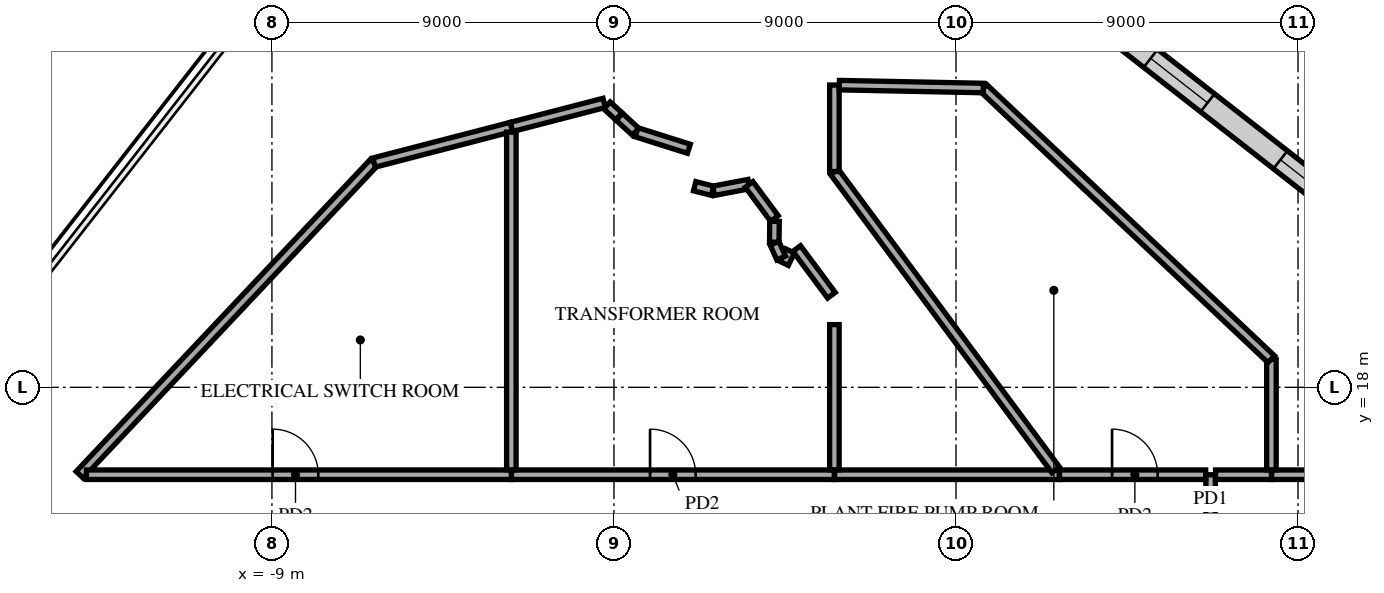
"""IFC4 building model, lengths in metres.
Left out: names, types, materials, properties, quantities, classifications, styles, units other than length and angle.
Written with IfcOpenShell. Run it as: python <this file> out.ifc"""

import sys

from ifc_helpers import new_model, si_unit, direction, frame, frame_2d, origin, place, context, subcontext, project, spatial, rectangle, extrude, element, fill, save


model = new_model("IFC4")
c1 = context("Model", 3, precision=1e-05, world=origin(), true_north=direction((0.0, 1.0)))
c2 = subcontext(c1, "Body", "Model", "MODEL_VIEW")
j1 = project(units=[si_unit("LENGTHUNIT", "METRE"), si_unit("PLANEANGLEUNIT", "RADIAN")], contexts=[c1])
p1 = place(None, origin())
s1 = spatial("IfcSite", under=j1, at=p1, CompositionType="ELEMENT")
p2 = place(p1, origin())
s2 = spatial("IfcBuilding", under=s1, at=p2, CompositionType="ELEMENT")
p3 = place(p2, frame((0.0, 0.0, 237.3)))
s3 = spatial("IfcBuildingStorey", under=s2, at=p3, CompositionType="ELEMENT", Elevation=237.3)
p4 = place(p3, frame((15.7, 12.227, 0.0), z_axis=(0.0, 0.0, 1.0), x_axis=(0.0, 1.0, 0.0)))
e1 = element("IfcWall", 1, at=p4, inside=s3, PredefinedType="PARTITIONING", context=c2, shape_type="SweptSolid", body=[
    extrude(rectangle(XDim=3.473, YDim=0.25, at=frame_2d((1.736, 0.0))), origin(), (0.0, 0.0, 1.0), 4.72),
])
p5 = place(p4, frame((1.232, 0.0, 0.0)))
e2 = element("IfcOpeningElement", 2, at=p5, cuts=e1, PredefinedType="OPENING", context=c2, shape_type="SweptSolid", body=[
    extrude(rectangle(XDim=1.0, YDim=2.1, at=frame_2d((0.5, 1.05))), frame((0.0, 0.135, 0.0), z_axis=(0.0, -1.0, 0.0), x_axis=(1.0, 0.0, 0.0)), (0.0, 0.0, 1.0), 0.27),
])
p6 = place(p3, frame((-14.06, 15.7, 0.0), z_axis=(0.0, 0.0, 1.0), x_axis=(0.685903590109, 0.727692424775, 0.0)))
e3 = element("IfcWall", 3, at=p6, inside=s3, PredefinedType="PARTITIONING", context=c2, shape_type="SweptSolid", body=[
    extrude(rectangle(XDim=11.287, YDim=0.25, at=frame_2d((5.644, 0.0))), origin(), (0.0, 0.0, 1.0), 4.72),
])
p7 = place(p3, frame((-13.881, 15.7, 0.0), z_axis=(0.0, 0.0, 1.0), x_axis=(1.0, 0.0, 0.0)))
e4 = element("IfcWall", 4, at=p7, inside=s3, PredefinedType="PARTITIONING", context=c2, shape_type="SweptSolid", body=[
    extrude(rectangle(XDim=11.181, YDim=0.25, at=frame_2d((5.591, 0.0))), origin(), (0.0, 0.0, 1.0), 4.72),
])
p8 = place(p7, frame((4.901, 0.0, 0.0)))
e5 = element("IfcOpeningElement", 5, at=p8, cuts=e4, PredefinedType="OPENING", context=c2, shape_type="SweptSolid", body=[
    extrude(rectangle(XDim=1.2, YDim=2.1, at=frame_2d((0.6, 1.05))), frame((0.0, 0.135, 0.0), z_axis=(0.0, -1.0, 0.0), x_axis=(1.0, 0.0, 0.0)), (0.0, 0.0, 1.0), 0.27),
])
p9 = place(p3, frame((-2.695, 15.7, 0.0), z_axis=(0.0, 0.0, 1.0), x_axis=(1.0, 0.0, 0.0)))
e6 = element("IfcWall", 6, at=p9, inside=s3, PredefinedType="PARTITIONING", context=c2, shape_type="SweptSolid", body=[
    extrude(rectangle(XDim=8.495, YDim=0.25, at=frame_2d((4.248, 0.0))), origin(), (0.0, 0.0, 1.0), 4.72),
])
p10 = place(p9, frame((3.645, 0.0, 0.0)))
e7 = element("IfcOpeningElement", 7, at=p10, cuts=e6, PredefinedType="OPENING", context=c2, shape_type="SweptSolid", body=[
    extrude(rectangle(XDim=1.2, YDim=2.1, at=frame_2d((0.6, 1.05))), frame((0.0, 0.135, 0.0), z_axis=(0.0, -1.0, 0.0), x_axis=(1.0, 0.0, 0.0)), (0.0, 0.0, 1.0), 0.27),
])
p11 = place(p3, frame((5.805, 15.7, 0.0), z_axis=(0.0, 0.0, 1.0), x_axis=(1.0, 0.0, 0.0)))
e8 = element("IfcWall", 8, at=p11, inside=s3, PredefinedType="PARTITIONING", context=c2, shape_type="SweptSolid", body=[
    extrude(rectangle(XDim=5.914, YDim=0.25, at=frame_2d((2.957, 0.0))), origin(), (0.0, 0.0, 1.0), 4.42),
])
p12 = place(p3, frame((5.8, 23.673, 0.0), z_axis=(0.0, 0.0, 1.0), x_axis=(0.5960533643, -0.802944821832, 0.0)))
e9 = element("IfcWall", 9, at=p12, inside=s3, PredefinedType="PARTITIONING", context=c2, shape_type="SweptSolid", body=[
    extrude(rectangle(XDim=9.767, YDim=0.25, at=frame_2d((4.884, 0.0))), origin(), (0.0, 0.0, 1.0), 4.72),
])
p13 = place(p3, frame((11.723, 15.7, 0.0), z_axis=(0.0, 0.0, 1.0), x_axis=(1.0, 0.0, 0.0)))
e10 = element("IfcWall", 10, at=p13, inside=s3, PredefinedType="PARTITIONING", context=c2, shape_type="SweptSolid", body=[
    extrude(rectangle(XDim=3.847, YDim=0.25, at=frame_2d((1.923, 0.0))), origin(), (0.0, 0.0, 1.0), 4.72),
])
p14 = place(p13, frame((1.383, 0.0, 0.0)))
e11 = element("IfcOpeningElement", 11, at=p14, cuts=e10, PredefinedType="OPENING", context=c2, shape_type="SweptSolid", body=[
    extrude(rectangle(XDim=1.2, YDim=2.1, at=frame_2d((0.6, 1.05))), frame((0.0, 0.135, 0.0), z_axis=(0.0, -1.0, 0.0), x_axis=(1.0, 0.0, 0.0)), (0.0, 0.0, 1.0), 0.27),
])
p15 = place(p3, frame((15.83, 15.7, 0.0), z_axis=(0.0, 0.0, 1.0), x_axis=(1.0, 0.0, 0.0)))
e12 = element("IfcWall", 12, at=p15, inside=s3, PredefinedType="PARTITIONING", context=c2, shape_type="SweptSolid", body=[
    extrude(rectangle(XDim=1.47, YDim=0.25, at=frame_2d((0.735, 0.0))), origin(), (0.0, 0.0, 1.0), 5.24),
])
p16 = place(p3, frame((17.305, 15.7, 0.0), z_axis=(0.0, 0.0, 1.0), x_axis=(1.0, 0.0, 0.0)))
e13 = element("IfcWall", 13, at=p16, inside=s3, PredefinedType="PARTITIONING", context=c2, shape_type="SweptSolid", body=[
    extrude(rectangle(XDim=3.216, YDim=0.25, at=frame_2d((1.608, 0.0))), origin(), (0.0, 0.0, 1.0), 4.72),
])
p17 = place(p3, frame((17.3, 15.83, 0.0), z_axis=(0.0, 0.0, 1.0), x_axis=(0.0, 1.0, 0.0)))
e14 = element("IfcWall", 14, at=p17, inside=s3, PredefinedType="PARTITIONING", context=c2, shape_type="SweptSolid", body=[
    extrude(rectangle(XDim=2.906, YDim=0.25, at=frame_2d((1.453, 0.0))), origin(), (0.0, 0.0, 1.0), 4.72),
])
p18 = place(p3, frame((5.8, 15.83, 0.0), z_axis=(0.0, 0.0, 1.0), x_axis=(0.0, 1.0, 0.0)))
e15 = element("IfcWall", 15, at=p18, inside=s3, PredefinedType="PARTITIONING", context=c2, shape_type="SweptSolid", body=[
    extrude(rectangle(XDim=3.821, YDim=0.25, at=frame_2d((1.91, 0.0))), origin(), (0.0, 0.0, 1.0), 4.42),
])
p19 = place(p3, frame((4.476, 21.262, 0.0), z_axis=(0.0, 0.0, 1.0), x_axis=(0.432927443795, 0.901428770569, 0.0)))
e16 = element("IfcWall", 16, at=p19, inside=s3, PredefinedType="PARTITIONING", context=c2, shape_type="SweptSolid", body=[
    extrude(rectangle(XDim=0.364, YDim=0.25, at=frame_2d((0.182, 0.0))), origin(), (0.0, 0.0, 1.0), 4.72),
])
p20 = place(p3, frame((4.808, 21.653, 0.0), z_axis=(0.0, 0.0, 1.0), x_axis=(0.59601596121, -0.802972586072, 0.0)))
e17 = element("IfcWall", 17, at=p20, inside=s3, PredefinedType="PARTITIONING", context=c2, shape_type="SweptSolid", body=[
    extrude(rectangle(XDim=1.532, YDim=0.25, at=frame_2d((0.766, 0.0))), origin(), (0.0, 0.0, 1.0), 5.24),
])
p21 = place(p3, frame((4.225, 21.79, 0.0), z_axis=(0.0, 0.0, 1.0), x_axis=(0.412201910165, -0.911092522885, 0.0)))
e18 = element("IfcWall", 18, at=p21, inside=s3, PredefinedType="PARTITIONING", context=c2, shape_type="SweptSolid", body=[
    extrude(rectangle(XDim=0.425, YDim=0.25, at=frame_2d((0.213, 0.0))), origin(), (0.0, 0.0, 1.0), 4.72),
])
p22 = place(p3, frame((4.219, 21.819, 0.0), z_axis=(0.0, 0.0, 1.0), x_axis=(0.011115364856, 0.999938222424, 0.0)))
e19 = element("IfcWall", 19, at=p22, inside=s3, PredefinedType="PARTITIONING", context=c2, shape_type="SweptSolid", body=[
    extrude(rectangle(XDim=0.549, YDim=0.25, at=frame_2d((0.274, 0.0))), origin(), (0.0, 0.0, 1.0), 4.72),
])
p23 = place(p3, frame((2.622, 23.172, 0.0), z_axis=(0.0, 0.0, 1.0), x_axis=(0.982424451701, 0.186660645823, 0.0)))
e20 = element("IfcWall", 20, at=p23, inside=s3, PredefinedType="PARTITIONING", context=c2, shape_type="SweptSolid", body=[
    extrude(rectangle(XDim=0.944, YDim=0.25, at=frame_2d((0.472, 0.0))), origin(), (0.0, 0.0, 1.0), 5.24),
])
p24 = place(p3, frame((2.124, 23.292, 0.0), z_axis=(0.0, 0.0, 1.0), x_axis=(0.969335780914, -0.24573999235, 0.0)))
e21 = element("IfcWall", 21, at=p24, inside=s3, PredefinedType="PARTITIONING", context=c2, shape_type="SweptSolid", body=[
    extrude(rectangle(XDim=0.484, YDim=0.25, at=frame_2d((0.242, 0.0))), origin(), (0.0, 0.0, 1.0), 5.24),
])
p25 = place(p3, frame((3.557, 23.339, 0.0), z_axis=(0.0, 0.0, 1.0), x_axis=(0.596106410755, -0.802905440918, 0.0)))
e22 = element("IfcWall", 22, at=p25, inside=s3, PredefinedType="PARTITIONING", context=c2, shape_type="SweptSolid", body=[
    extrude(rectangle(XDim=1.116, YDim=0.25, at=frame_2d((0.558, 0.0))), origin(), (0.0, 0.0, 1.0), 4.72),
])
p26 = place(p3, frame((5.8, 23.679, 0.0), z_axis=(0.0, 0.0, 1.0), x_axis=(0.0, 1.0, 0.0)))
e23 = element("IfcWall", 23, at=p26, inside=s3, PredefinedType="PARTITIONING", context=c2, shape_type="SweptSolid", body=[
    extrude(rectangle(XDim=2.276, YDim=0.25, at=frame_2d((1.138, 0.0))), origin(), (0.0, 0.0, 1.0), 5.24),
])
p27 = place(p3, frame((-6.312, 23.915, 0.0), z_axis=(0.0, 0.0, 1.0), x_axis=(0.967996898166, 0.250962158784, 0.0)))
e24 = element("IfcWall", 24, at=p27, inside=s3, PredefinedType="PARTITIONING", context=c2, shape_type="SweptSolid", body=[
    extrude(rectangle(XDim=3.732, YDim=0.25, at=frame_2d((1.866, 0.0))), origin(), (0.0, 0.0, 1.0), 4.72),
])
p28 = place(p3, frame((0.594, 24.712, 0.0), z_axis=(0.0, 0.0, 1.0), x_axis=(0.953505954531, -0.301374177186, 0.0)))
e25 = element("IfcWall", 25, at=p28, inside=s3, PredefinedType="PARTITIONING", context=c2, shape_type="SweptSolid", body=[
    extrude(rectangle(XDim=1.444, YDim=0.25, at=frame_2d((0.722, 0.0))), origin(), (0.0, 0.0, 1.0), 5.24),
])
p29 = place(p3, frame((-2.7, 15.83, 0.0), z_axis=(0.0, 0.0, 1.0), x_axis=(0.0, 1.0, 0.0)))
e26 = element("IfcWall", 26, at=p29, inside=s3, PredefinedType="PARTITIONING", context=c2, shape_type="SweptSolid", body=[
    extrude(rectangle(XDim=8.887, YDim=0.25, at=frame_2d((4.444, 0.0))), origin(), (0.0, 0.0, 1.0), 5.24),
])
p30 = place(p3, frame((-2.695, 24.853, 0.0), z_axis=(0.0, 0.0, 1.0), x_axis=(0.968002130476, 0.250941976149, 0.0)))
e27 = element("IfcWall", 27, at=p30, inside=s3, PredefinedType="PARTITIONING", context=c2, shape_type="SweptSolid", body=[
    extrude(rectangle(XDim=2.519, YDim=0.25, at=frame_2d((1.259, 0.0))), origin(), (0.0, 0.0, 1.0), 4.42),
])
p31 = place(p3, frame((0.141, 25.12, 0.0), z_axis=(0.0, 0.0, 1.0), x_axis=(0.736892649159, -0.67600978071, 0.0)))
e28 = element("IfcWall", 28, at=p31, inside=s3, PredefinedType="PARTITIONING", context=c2, shape_type="SweptSolid", body=[
    extrude(rectangle(XDim=0.582, YDim=0.25, at=frame_2d((0.291, 0.0))), origin(), (0.0, 0.0, 1.0), 4.72),
])
p32 = place(p3, frame((-0.184, 25.418, 0.0), z_axis=(0.0, 0.0, 1.0), x_axis=(0.736774109701, -0.676138973344, 0.0)))
e29 = element("IfcWall", 29, at=p32, inside=s3, PredefinedType="PARTITIONING", context=c2, shape_type="SweptSolid", body=[
    extrude(rectangle(XDim=0.427, YDim=0.25, at=frame_2d((0.213, 0.0))), origin(), (0.0, 0.0, 1.0), 4.72),
])
p33 = place(p3, frame((9.725, 25.876, 0.0), z_axis=(0.0, 0.0, 1.0), x_axis=(0.72767407702, -0.685923055185, 0.0)))
e30 = element("IfcWall", 30, at=p33, inside=s3, PredefinedType="PARTITIONING", context=c2, shape_type="SweptSolid", body=[
    extrude(rectangle(XDim=10.403, YDim=0.25, at=frame_2d((5.201, 0.0))), origin(), (0.0, 0.0, 1.0), 4.406),
])
p34 = place(p3, frame((5.93, 25.952, 0.0), z_axis=(0.0, 0.0, 1.0), x_axis=(0.999797889921, -0.020104211244, 0.0)))
e31 = element("IfcWall", 31, at=p34, inside=s3, PredefinedType="PARTITIONING", context=c2, shape_type="SweptSolid", body=[
    extrude(rectangle(XDim=3.789, YDim=0.25, at=frame_2d((1.895, 0.0))), origin(), (0.0, 0.0, 1.0), 4.406),
])
p35 = place(p3, frame((33.651, 11.398, 0.0), z_axis=(0.0, 0.0, 1.0), x_axis=(-0.788011466291, 0.61566056313, 0.0)))
e32 = element("IfcWall", 32, at=p35, inside=s3, PredefinedType="STANDARD", context=c2, shape_type="SweptSolid", body=[
    extrude(rectangle(XDim=39.0, YDim=0.6, at=frame_2d((19.5, 0.0))), origin(), (0.0, 0.0, 1.0), 5.24),
])
p36 = place(p35, frame((1.217, 0.0, 0.6)))
e33 = element("IfcOpeningElement", 33, at=p36, cuts=e32, PredefinedType="OPENING", context=c2, shape_type="SweptSolid", body=[
    extrude(rectangle(XDim=1.9, YDim=4.19, at=frame_2d((0.95, 2.095))), frame((0.0, 0.31, 0.0), z_axis=(0.0, -1.0, 0.0), x_axis=(1.0, 0.0, 0.0)), (0.0, 0.0, 1.0), 0.62),
])
p37 = place(p35, frame((5.55, 0.0, 0.6)))
e34 = element("IfcOpeningElement", 34, at=p37, cuts=e32, PredefinedType="OPENING", context=c2, shape_type="SweptSolid", body=[
    extrude(rectangle(XDim=1.9, YDim=4.19, at=frame_2d((0.95, 2.095))), frame((0.0, 0.31, 0.0), z_axis=(0.0, -1.0, 0.0), x_axis=(1.0, 0.0, 0.0)), (0.0, 0.0, 1.0), 0.62),
])
p38 = place(p35, frame((18.55, 0.0, 0.6)))
e35 = element("IfcOpeningElement", 35, at=p38, cuts=e32, PredefinedType="OPENING", context=c2, shape_type="SweptSolid", body=[
    extrude(rectangle(XDim=1.9, YDim=4.19, at=frame_2d((0.95, 2.095))), frame((0.0, 0.31, 0.0), z_axis=(0.0, -1.0, 0.0), x_axis=(1.0, 0.0, 0.0)), (0.0, 0.0, 1.0), 0.62),
])
p39 = place(p35, frame((22.883, 0.0, 0.6)))
e36 = element("IfcOpeningElement", 36, at=p39, cuts=e32, PredefinedType="OPENING", context=c2, shape_type="SweptSolid", body=[
    extrude(rectangle(XDim=1.9, YDim=4.19, at=frame_2d((0.95, 2.095))), frame((0.0, 0.31, 0.0), z_axis=(0.0, -1.0, 0.0), x_axis=(1.0, 0.0, 0.0)), (0.0, 0.0, 1.0), 0.62),
])
p40 = place(p35, frame((31.55, 0.0, 0.6)))
e37 = element("IfcOpeningElement", 37, at=p40, cuts=e32, PredefinedType="OPENING", context=c2, shape_type="SweptSolid", body=[
    extrude(rectangle(XDim=1.9, YDim=4.19, at=frame_2d((0.95, 2.095))), frame((0.0, 0.31, 0.0), z_axis=(0.0, -1.0, 0.0), x_axis=(1.0, 0.0, 0.0)), (0.0, 0.0, 1.0), 0.62),
])
p41 = place(p35, frame((35.883, 0.0, 0.6)))
e38 = element("IfcOpeningElement", 38, at=p41, cuts=e32, PredefinedType="OPENING", context=c2, shape_type="SweptSolid", body=[
    extrude(rectangle(XDim=1.9, YDim=4.19, at=frame_2d((0.95, 2.095))), frame((0.0, 0.31, 0.0), z_axis=(0.0, -1.0, 0.0), x_axis=(1.0, 0.0, 0.0)), (0.0, 0.0, 1.0), 0.62),
])
p42 = place(p8, origin())
e39 = element("IfcDoor", 39, at=p42, inside=s3, OperationType="SINGLE_SWING_RIGHT", PredefinedType="DOOR", context=c2, shape_type="SweptSolid", body=[
    extrude(rectangle(XDim=1.2, YDim=2.1, at=frame_2d((0.6, 1.05))), frame((0.0, 0.025, 0.0), z_axis=(0.0, -1.0, 0.0), x_axis=(1.0, 0.0, 0.0)), (0.0, 0.0, 1.0), 0.05),
])
fill(e5, e39)
p43 = place(p10, origin())
e40 = element("IfcDoor", 40, at=p43, inside=s3, OperationType="SINGLE_SWING_LEFT", PredefinedType="DOOR", context=c2, shape_type="SweptSolid", body=[
    extrude(rectangle(XDim=1.2, YDim=2.1, at=frame_2d((0.6, 1.05))), frame((0.0, 0.025, 0.0), z_axis=(0.0, -1.0, 0.0), x_axis=(1.0, 0.0, 0.0)), (0.0, 0.0, 1.0), 0.05),
])
fill(e7, e40)
p44 = place(p14, origin())
e41 = element("IfcDoor", 41, at=p44, inside=s3, OperationType="SINGLE_SWING_RIGHT", PredefinedType="DOOR", context=c2, shape_type="SweptSolid", body=[
    extrude(rectangle(XDim=1.2, YDim=2.1, at=frame_2d((0.6, 1.05))), frame((0.0, 0.025, 0.0), z_axis=(0.0, -1.0, 0.0), x_axis=(1.0, 0.0, 0.0)), (0.0, 0.0, 1.0), 0.05),
])
fill(e11, e41)
p45 = place(p38, origin())
e42 = element("IfcWindow", 42, at=p45, inside=s3, PartitioningType="SINGLE_PANEL", PredefinedType="USERDEFINED", context=c2, shape_type="SweptSolid", body=[
    extrude(rectangle(XDim=1.9, YDim=4.19, at=frame_2d((0.95, 2.095))), frame((0.0, 0.03, 0.0), z_axis=(0.0, -1.0, 0.0), x_axis=(1.0, 0.0, 0.0)), (0.0, 0.0, 1.0), 0.06),
])
fill(e35, e42)
p46 = place(p39, origin())
e43 = element("IfcWindow", 43, at=p46, inside=s3, PartitioningType="SINGLE_PANEL", PredefinedType="USERDEFINED", context=c2, shape_type="SweptSolid", body=[
    extrude(rectangle(XDim=1.9, YDim=4.19, at=frame_2d((0.95, 2.095))), frame((0.0, 0.03, 0.0), z_axis=(0.0, -1.0, 0.0), x_axis=(1.0, 0.0, 0.0)), (0.0, 0.0, 1.0), 0.06),
])
fill(e36, e43)
save(model, sys.argv[1])
